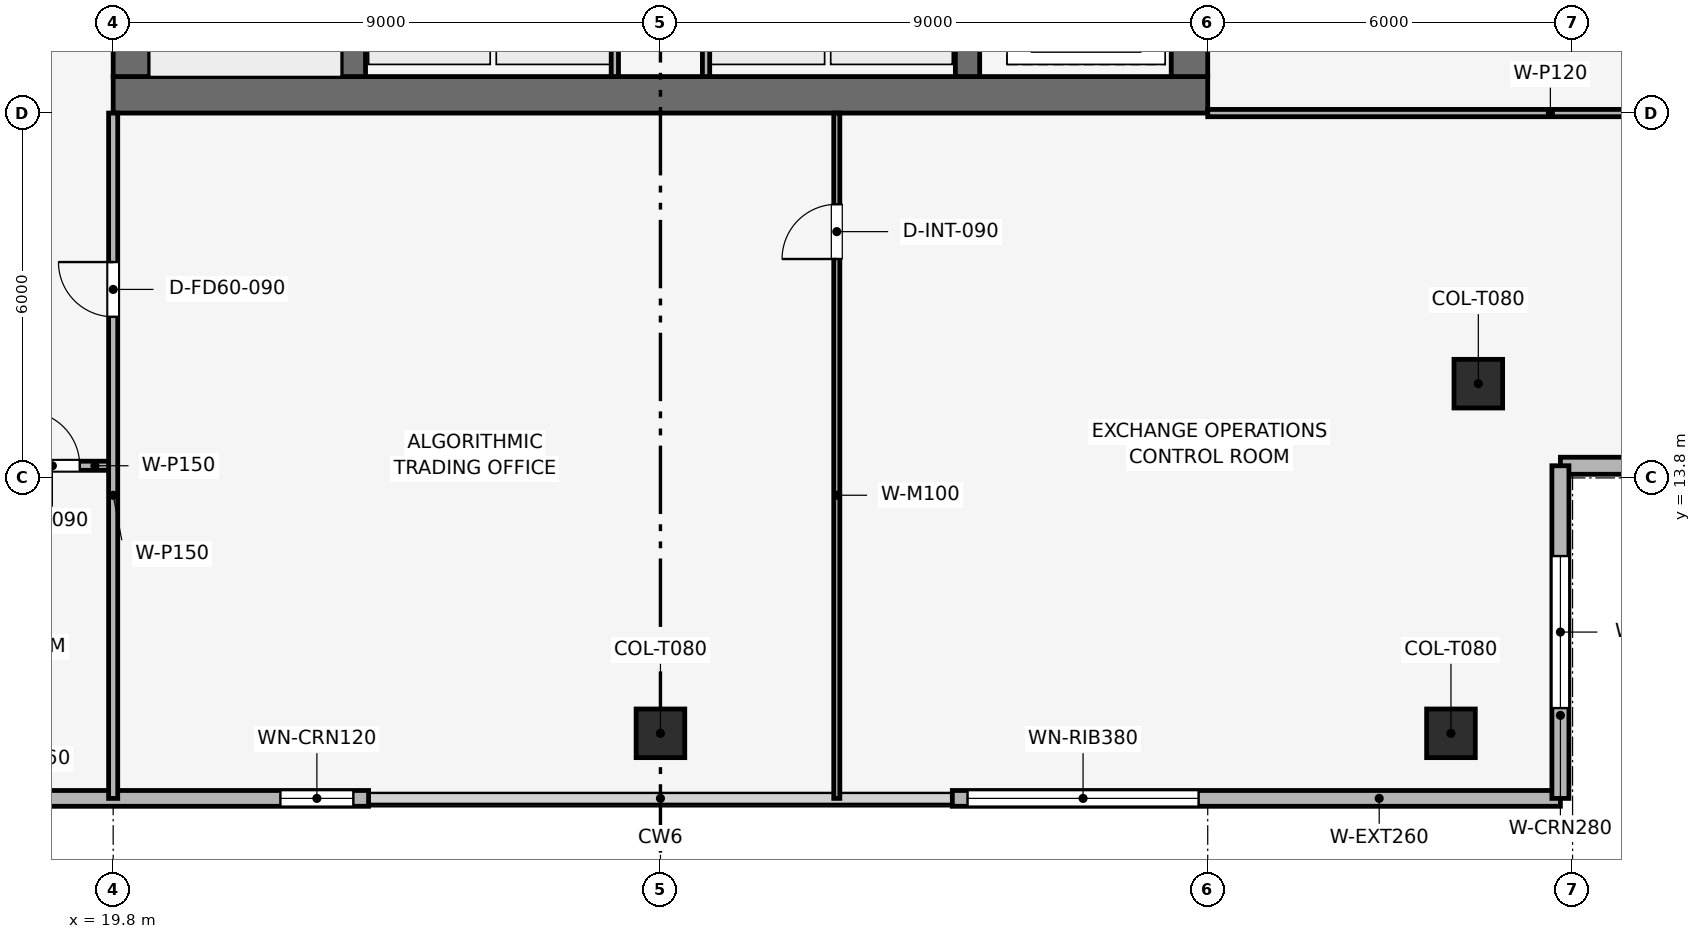
"""IFC4 building model, lengths in metres.
Left out: names, types, materials, properties, quantities, classifications, styles, units other than length and angle.
Written with IfcOpenShell. Run it as: python <this file> out.ifc"""

import sys

from ifc_helpers import new_model, si_unit, direction, frame, frame_2d, origin, origin_2d, place, context, subcontext, project, spatial, rectangle, extrude, element, fill, save


model = new_model("IFC4")
c1 = context("Model", 3, precision=1e-05, world=origin(), true_north=direction((0.0, 1.0)))
c2 = subcontext(c1, "Body", "Model", "MODEL_VIEW")
j1 = project(units=[si_unit("LENGTHUNIT", "METRE"), si_unit("PLANEANGLEUNIT", "RADIAN")], contexts=[c1])
p1 = place(None, origin())
s1 = spatial("IfcSite", under=j1, at=p1, CompositionType="ELEMENT")
p2 = place(p1, origin())
s2 = spatial("IfcBuilding", under=s1, at=p2, CompositionType="ELEMENT")
p3 = place(p2, frame((0.0, 0.0, 360.0)))
s3 = spatial("IfcBuildingStorey", under=s2, at=p3, CompositionType="ELEMENT", Elevation=360.0)
p4 = place(p3, frame((19.8, 20.1, 0.0), z_axis=(0.0, 0.0, 1.0), x_axis=(1.0, 0.0, 0.0)))
e1 = element("IfcWall", 1, at=p4, inside=s3, PredefinedType="SHEAR", context=c2, shape_type="SweptSolid", body=[
    extrude(rectangle(XDim=18.0, YDim=0.6, at=frame_2d((9.0, 0.0))), origin(), (0.0, 0.0, 1.0), 4.5),
])
p5 = place(p3, frame((20.1, 20.4, 0.0), z_axis=(0.0, 0.0, 1.0), x_axis=(0.0, 1.0, 0.0)))
e2 = element("IfcWall", 2, at=p5, inside=s3, PredefinedType="SHEAR", context=c2, shape_type="SweptSolid", body=[
    extrude(rectangle(XDim=16.8, YDim=0.6, at=frame_2d((8.4, 0.0))), origin(), (0.0, 0.0, 1.0), 4.5),
])
p6 = place(p5, frame((10.4, 0.0, 0.0)))
e3 = element("IfcOpeningElement", 3, at=p6, cuts=e2, PredefinedType="OPENING", context=c2, shape_type="SweptSolid", body=[
    extrude(rectangle(XDim=1.1, YDim=2.15, at=frame_2d((0.55, 1.075))), frame((0.0, 0.31, 0.0), z_axis=(0.0, -1.0, 0.0), x_axis=(1.0, 0.0, 0.0)), (0.0, 0.0, 1.0), 0.62),
])
p7 = place(p3, frame((37.5, 20.4, 0.0), z_axis=(0.0, 0.0, 1.0), x_axis=(0.0, 1.0, 0.0)))
e4 = element("IfcWall", 4, at=p7, inside=s3, PredefinedType="SHEAR", context=c2, shape_type="SweptSolid", body=[
    extrude(rectangle(XDim=16.8, YDim=0.6, at=frame_2d((8.4, 0.0))), origin(), (0.0, 0.0, 1.0), 4.5),
])
p8 = place(p7, frame((4.9, 0.0, 0.0)))
e5 = element("IfcOpeningElement", 5, at=p8, cuts=e4, PredefinedType="OPENING", context=c2, shape_type="SweptSolid", body=[
    extrude(rectangle(XDim=1.1, YDim=2.15, at=frame_2d((0.55, 1.075))), frame((0.0, 0.31, 0.0), z_axis=(0.0, -1.0, 0.0), x_axis=(1.0, 0.0, 0.0)), (0.0, 0.0, 1.0), 0.62),
])
for number, where, z_axis, x_axis in (
    (6, (23.75, 20.4, 0.0), (0.0, 0.0, 1.0), (0.0, 1.0, 0.0)),
    (7, (33.85, 20.4, 0.0), (0.0, 0.0, 1.0), (0.0, 1.0, 0.0)),
):
    element("IfcWall", number, at=place(p3, frame(where, z_axis=z_axis, x_axis=x_axis)), inside=s3, PredefinedType="SHEAR", context=c2, shape_type="SweptSolid", body=[
        extrude(rectangle(XDim=16.8, YDim=0.4, at=frame_2d((8.4, 0.0))), origin(), (0.0, 0.0, 1.0), 4.5),
    ])
for number, where, z_axis, x_axis in (
    (8, (28.8, 9.6, 0.003), (0.0, 0.0, 1.0), (1.0, 0.0, 0.0)),
    (9, (41.8, 9.6, 0.003), (0.0, 0.0, 1.0), (1.0, 0.0, 0.0)),
    (10, (42.25, 15.35, 0.003), (0.0, 0.0, 1.0), (1.0, 0.0, 0.0)),
):
    element("IfcColumn", number, at=place(p3, frame(where, z_axis=z_axis, x_axis=x_axis)), inside=s3, PredefinedType="COLUMN", context=c2, shape_type="SweptSolid", body=[
        extrude(rectangle(XDim=0.8, YDim=0.8, at=origin_2d()), origin(), (0.0, 0.0, 1.0), 4.234),
    ])
p9 = place(p3, frame((43.6, 8.53, 0.0), z_axis=(0.0, 0.0, 1.0), x_axis=(-1.0, 0.0, 0.0)))
e11 = element("IfcWall", 11, at=p9, inside=s3, PredefinedType="SOLIDWALL", context=c2, shape_type="SweptSolid", body=[
    extrude(rectangle(XDim=10.0, YDim=0.26, at=frame_2d((5.0, 0.0))), origin(), (0.0, 0.0, 1.0), 4.24),
])
p10 = place(p9, frame((5.95, 0.0, 0.9)))
e12 = element("IfcOpeningElement", 12, at=p10, cuts=e11, PredefinedType="OPENING", context=c2, shape_type="SweptSolid", body=[
    extrude(rectangle(XDim=3.8, YDim=1.9, at=frame_2d((1.9, 0.95))), frame((0.0, 0.14, 0.0), z_axis=(0.0, -1.0, 0.0), x_axis=(1.0, 0.0, 0.0)), (0.0, 0.0, 1.0), 0.28),
])
p11 = place(p3, frame((24.0, 8.53, 0.0), z_axis=(0.0, 0.0, 1.0), x_axis=(-1.0, 0.0, 0.0)))
e13 = element("IfcWall", 13, at=p11, inside=s3, PredefinedType="SOLIDWALL", context=c2, shape_type="SweptSolid", body=[
    extrude(rectangle(XDim=10.0, YDim=0.26, at=frame_2d((5.0, 0.0))), origin(), (0.0, 0.0, 1.0), 4.24),
])
p12 = place(p11, frame((0.25, 0.0, 0.9)))
e14 = element("IfcOpeningElement", 14, at=p12, cuts=e13, PredefinedType="OPENING", context=c2, shape_type="SweptSolid", body=[
    extrude(rectangle(XDim=1.2, YDim=2.1, at=frame_2d((0.6, 1.05))), frame((0.0, 0.14, 0.0), z_axis=(0.0, -1.0, 0.0), x_axis=(1.0, 0.0, 0.0)), (0.0, 0.0, 1.0), 0.28),
])
p13 = place(p3, frame((49.07, 14.0, 0.0), z_axis=(0.0, 0.0, 1.0), x_axis=(-1.0, 0.0, 0.0)))
e15 = element("IfcWall", 15, at=p13, inside=s3, PredefinedType="SOLIDWALL", context=c2, shape_type="SweptSolid", body=[
    extrude(rectangle(XDim=5.47, YDim=0.28, at=frame_2d((2.735, 0.0))), origin(), (0.0, 0.0, 1.0), 4.24),
])
p14 = place(p13, frame((1.485, 0.0, 0.9)))
e16 = element("IfcOpeningElement", 16, at=p14, cuts=e15, PredefinedType="OPENING", context=c2, shape_type="SweptSolid", body=[
    extrude(rectangle(XDim=2.5, YDim=1.9, at=frame_2d((1.25, 0.95))), frame((0.0, 0.15, 0.0), z_axis=(0.0, -1.0, 0.0), x_axis=(1.0, 0.0, 0.0)), (0.0, 0.0, 1.0), 0.3),
])
p15 = place(p3, frame((43.6, 14.0, 0.0), z_axis=(0.0, 0.0, 1.0), x_axis=(0.0, -1.0, 0.0)))
e17 = element("IfcWall", 17, at=p15, inside=s3, PredefinedType="SOLIDWALL", context=c2, shape_type="SweptSolid", body=[
    extrude(rectangle(XDim=5.47, YDim=0.28, at=frame_2d((2.735, 0.0))), origin(), (0.0, 0.0, 1.0), 4.24),
])
p16 = place(p15, frame((1.485, 0.0, 0.9)))
e18 = element("IfcOpeningElement", 18, at=p16, cuts=e17, PredefinedType="OPENING", context=c2, shape_type="SweptSolid", body=[
    extrude(rectangle(XDim=2.5, YDim=1.9, at=frame_2d((1.25, 0.95))), frame((0.0, 0.15, 0.0), z_axis=(0.0, -1.0, 0.0), x_axis=(1.0, 0.0, 0.0)), (0.0, 0.0, 1.0), 0.3),
])
p17 = place(p3, frame((28.05, 20.4, 0.0), z_axis=(0.0, 0.0, 1.0), x_axis=(0.0, 1.0, 0.0)))
e19 = element("IfcWall", 19, at=p17, inside=s3, PredefinedType="PARTITIONING", context=c2, shape_type="SweptSolid", body=[
    extrude(rectangle(XDim=8.15, YDim=0.12, at=frame_2d((4.075, 0.0))), origin(), (0.0, 0.0, 1.0), 4.24),
])
p18 = place(p3, frame((29.55, 20.4, 0.0), z_axis=(0.0, 0.0, 1.0), x_axis=(0.0, 1.0, 0.0)))
e20 = element("IfcWall", 20, at=p18, inside=s3, PredefinedType="PARTITIONING", context=c2, shape_type="SweptSolid", body=[
    extrude(rectangle(XDim=2.75, YDim=0.12, at=frame_2d((1.375, 0.0))), origin(), (0.0, 0.0, 1.0), 4.24),
])
p19 = place(p3, frame((17.9, 14.0, 0.0), z_axis=(0.0, 0.0, 1.0), x_axis=(1.0, 0.0, 0.0)))
e21 = element("IfcWall", 21, at=p19, inside=s3, PredefinedType="PARTITIONING", context=c2, shape_type="SweptSolid", body=[
    extrude(rectangle(XDim=1.9, YDim=0.15, at=frame_2d((0.95, 0.0))), origin(), (0.0, 0.0, 1.0), 4.24),
])
p20 = place(p19, frame((0.45, 0.0, 0.0)))
e22 = element("IfcOpeningElement", 22, at=p20, cuts=e21, PredefinedType="OPENING", context=c2, shape_type="SweptSolid", body=[
    extrude(rectangle(XDim=0.9, YDim=2.1, at=frame_2d((0.45, 1.05))), frame((0.0, 0.085, 0.0), z_axis=(0.0, -1.0, 0.0), x_axis=(1.0, 0.0, 0.0)), (0.0, 0.0, 1.0), 0.17),
])
p21 = place(p3, frame((19.8, 8.53, 0.0), z_axis=(0.0, 0.0, 1.0), x_axis=(0.0, 1.0, 0.0)))
e23 = element("IfcWall", 23, at=p21, inside=s3, PredefinedType="PARTITIONING", context=c2, shape_type="SweptSolid", body=[
    extrude(rectangle(XDim=11.27, YDim=0.15, at=frame_2d((5.635, 0.0))), origin(), (0.0, 0.0, 1.0), 3.825),
])
p22 = place(p21, frame((7.92, 0.0, 0.0)))
e24 = element("IfcOpeningElement", 24, at=p22, cuts=e23, PredefinedType="OPENING", context=c2, shape_type="SweptSolid", body=[
    extrude(rectangle(XDim=0.9, YDim=2.1, at=frame_2d((0.45, 1.05))), frame((0.0, 0.085, 0.0), z_axis=(0.0, -1.0, 0.0), x_axis=(1.0, 0.0, 0.0)), (0.0, 0.0, 1.0), 0.17),
])
p23 = place(p3, frame((31.7, 8.53, 0.0), z_axis=(0.0, 0.0, 1.0), x_axis=(0.0, 1.0, 0.0)))
e25 = element("IfcWall", 25, at=p23, inside=s3, PredefinedType="MOVABLE", context=c2, shape_type="SweptSolid", body=[
    extrude(rectangle(XDim=11.27, YDim=0.1, at=frame_2d((5.635, 0.0))), origin(), (0.0, 0.0, 1.0), 3.865),
])
p24 = place(p23, frame((8.87, 0.0, 0.0)))
e26 = element("IfcOpeningElement", 26, at=p24, cuts=e25, PredefinedType="OPENING", context=c2, shape_type="SweptSolid", body=[
    extrude(rectangle(XDim=0.9, YDim=2.1, at=frame_2d((0.45, 1.05))), frame((0.0, 0.06, 0.0), z_axis=(0.0, -1.0, 0.0), x_axis=(1.0, 0.0, 0.0)), (0.0, 0.0, 1.0), 0.12),
])
p25 = place(p3, frame((37.8, 19.8, 0.0), z_axis=(0.0, 0.0, 1.0), x_axis=(1.0, 0.0, 0.0)))
e27 = element("IfcWall", 27, at=p25, inside=s3, PredefinedType="PARTITIONING", context=c2, shape_type="SweptSolid", body=[
    extrude(rectangle(XDim=11.27, YDim=0.12, at=frame_2d((5.635, 0.0))), origin(), (0.0, 0.0, 1.0), 3.825),
])
p26 = place(p10, origin())
e28 = element("IfcWindow", 28, at=p26, inside=s3, PartitioningType="SINGLE_PANEL", PredefinedType="WINDOW", context=c2, shape_type="SweptSolid", body=[
    extrude(rectangle(XDim=3.8, YDim=1.9, at=frame_2d((1.9, 0.95))), frame((0.0, 0.03, 0.0), z_axis=(0.0, -1.0, 0.0), x_axis=(1.0, 0.0, 0.0)), (0.0, 0.0, 1.0), 0.06),
])
fill(e12, e28)
p27 = place(p12, origin())
e29 = element("IfcWindow", 29, at=p27, inside=s3, PartitioningType="SINGLE_PANEL", PredefinedType="WINDOW", context=c2, shape_type="SweptSolid", body=[
    extrude(rectangle(XDim=1.2, YDim=2.1, at=frame_2d((0.6, 1.05))), frame((0.0, 0.03, 0.0), z_axis=(0.0, -1.0, 0.0), x_axis=(1.0, 0.0, 0.0)), (0.0, 0.0, 1.0), 0.06),
])
fill(e14, e29)
p28 = place(p16, origin())
e30 = element("IfcWindow", 30, at=p28, inside=s3, PartitioningType="SINGLE_PANEL", PredefinedType="WINDOW", context=c2, shape_type="SweptSolid", body=[
    extrude(rectangle(XDim=2.5, YDim=1.9, at=frame_2d((1.25, 0.95))), frame((0.0, 0.03, 0.0), z_axis=(0.0, -1.0, 0.0), x_axis=(1.0, 0.0, 0.0)), (0.0, 0.0, 1.0), 0.06),
])
fill(e18, e30)
p29 = place(p20, origin())
e31 = element("IfcDoor", 31, at=p29, inside=s3, OperationType="SINGLE_SWING_LEFT", PredefinedType="DOOR", context=c2, shape_type="SweptSolid", body=[
    extrude(rectangle(XDim=0.9, YDim=2.1, at=frame_2d((0.45, 1.05))), frame((0.0, 0.025, 0.0), z_axis=(0.0, -1.0, 0.0), x_axis=(1.0, 0.0, 0.0)), (0.0, 0.0, 1.0), 0.05),
])
fill(e22, e31)
p30 = place(p22, origin())
e32 = element("IfcDoor", 32, at=p30, inside=s3, OperationType="SINGLE_SWING_RIGHT", PredefinedType="DOOR", context=c2, shape_type="SweptSolid", body=[
    extrude(rectangle(XDim=0.9, YDim=2.1, at=frame_2d((0.45, 1.05))), frame((0.0, 0.025, 0.0), z_axis=(0.0, -1.0, 0.0), x_axis=(1.0, 0.0, 0.0)), (0.0, 0.0, 1.0), 0.05),
])
fill(e24, e32)
p31 = place(p24, origin())
e33 = element("IfcDoor", 33, at=p31, inside=s3, OperationType="SINGLE_SWING_LEFT", PredefinedType="DOOR", context=c2, shape_type="SweptSolid", body=[
    extrude(rectangle(XDim=0.9, YDim=2.1, at=frame_2d((0.45, 1.05))), frame((0.0, 0.025, 0.0), z_axis=(0.0, -1.0, 0.0), x_axis=(1.0, 0.0, 0.0)), (0.0, 0.0, 1.0), 0.05),
])
fill(e26, e33)
save(model, sys.argv[1])
